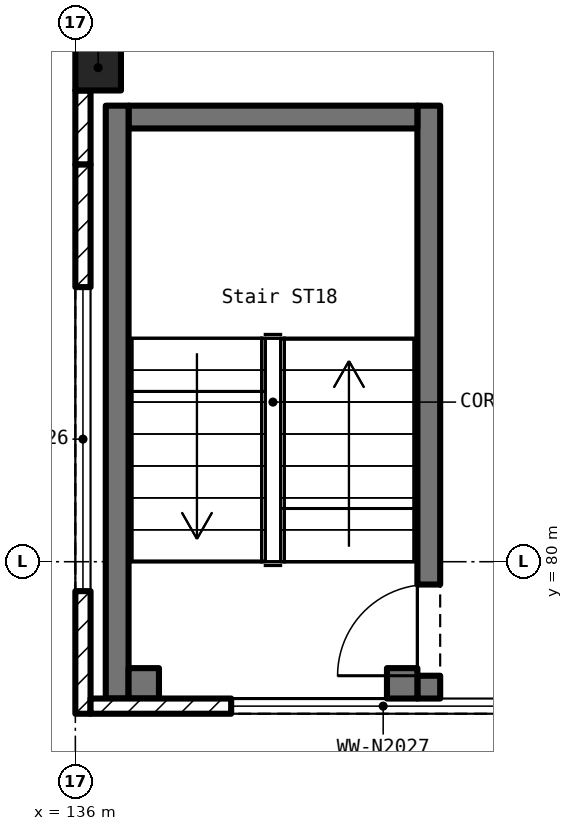
"""IFC4 building model, lengths in metres.
Left out: names, types, materials, properties, quantities, classifications, styles, units other than length and angle.
Written with IfcOpenShell. Run it as: python <this file> out.ifc"""

import sys

from ifc_helpers import new_model, si_unit, direction, frame, frame_2d, origin, origin_2d, place, context, subcontext, project, spatial, rectangle, extrude, element, fill, save


model = new_model("IFC4")
c1 = context("Model", 3, precision=1e-05, world=origin(), true_north=direction((0.0, 1.0)))
c2 = subcontext(c1, "Body", "Model", "MODEL_VIEW")
j1 = project(units=[si_unit("LENGTHUNIT", "METRE"), si_unit("PLANEANGLEUNIT", "RADIAN")], contexts=[c1])
p1 = place(None, origin())
s1 = spatial("IfcSite", under=j1, at=p1, CompositionType="ELEMENT")
p2 = place(p1, origin())
s2 = spatial("IfcBuilding", under=s1, at=p2, CompositionType="ELEMENT")
p3 = place(p2, frame((0.0, 0.0, 11.5)))
s3 = spatial("IfcBuildingStorey", under=s2, at=p3, CompositionType="ELEMENT", Elevation=11.5)
p4 = place(p3, frame((136.3, 86.5, 0.0), z_axis=(0.0, 0.0, 1.0), x_axis=(1.0, 0.0, 0.0)))
e1 = element("IfcColumn", 1, at=p4, inside=s3, PredefinedType="COLUMN", context=c2, shape_type="SweptSolid", body=[
    extrude(rectangle(XDim=0.6, YDim=0.6, at=origin_2d()), origin(), (0.0, 0.0, 1.0), 5.5),
])
p5 = place(p3, frame((136.1, 86.2, 0.0), z_axis=(0.0, 0.0, 1.0), x_axis=(0.0, -1.0, 0.0)))
e2 = element("IfcWall", 2, at=p5, inside=s3, PredefinedType="SOLIDWALL", context=c2, shape_type="SweptSolid", body=[
    extrude(rectangle(XDim=0.975, YDim=0.2, at=frame_2d((0.487, 0.0))), origin(), (0.0, 0.0, 1.0), 4.55),
])
p6 = place(p3, frame((136.1, 85.225, 0.0), z_axis=(0.0, 0.0, 1.0), x_axis=(0.0, -1.0, 0.0)))
e3 = element("IfcWall", 3, at=p6, inside=s3, PredefinedType="SOLIDWALL", context=c2, shape_type="SweptSolid", body=[
    extrude(rectangle(XDim=7.225, YDim=0.2, at=frame_2d((3.613, 0.0))), origin(), (0.0, 0.0, 1.0), 4.55),
])
p7 = place(p6, frame((1.612, 0.0, 1.0)))
e4 = element("IfcOpeningElement", 4, at=p7, cuts=e3, PredefinedType="OPENING", context=c2, shape_type="SweptSolid", body=[
    extrude(rectangle(XDim=4.0, YDim=1.8, at=frame_2d((2.0, 0.9))), frame((0.0, 0.112, 0.0), z_axis=(0.0, -1.0, 0.0), x_axis=(1.0, 0.0, 0.0)), (0.0, 0.0, 1.0), 0.224),
])
p8 = place(p3, frame((136.2, 78.1, 0.0), z_axis=(0.0, 0.0, 1.0), x_axis=(1.0, 0.0, 0.0)))
e5 = element("IfcWall", 5, at=p8, inside=s3, PredefinedType="SOLIDWALL", context=c2, shape_type="SweptSolid", body=[
    extrude(rectangle(XDim=7.7, YDim=0.2, at=frame_2d((3.85, 0.0))), origin(), (0.0, 0.0, 1.0), 4.55),
])
p9 = place(p8, frame((1.85, 0.0, 1.0)))
e6 = element("IfcOpeningElement", 6, at=p9, cuts=e5, PredefinedType="OPENING", context=c2, shape_type="SweptSolid", body=[
    extrude(rectangle(XDim=4.0, YDim=1.8, at=frame_2d((2.0, 0.9))), frame((0.0, 0.112, 0.0), z_axis=(0.0, -1.0, 0.0), x_axis=(1.0, 0.0, 0.0)), (0.0, 0.0, 1.0), 0.224),
])
p10 = place(p3, frame((140.65, 78.2, 0.0), z_axis=(0.0, 0.0, 1.0), x_axis=(0.0, 1.0, 0.0)))
e7 = element("IfcWall", 7, at=p10, inside=s3, PredefinedType="SOLIDWALL", context=c2, shape_type="SweptSolid", body=[
    extrude(rectangle(XDim=7.8, YDim=0.3, at=frame_2d((3.9, 0.0))), origin(), (0.0, 0.0, 1.0), 5.5),
])
p11 = place(p10, frame((0.3, 0.0, 0.0)))
e8 = element("IfcOpeningElement", 8, at=p11, cuts=e7, PredefinedType="OPENING", context=c2, shape_type="SweptSolid", body=[
    extrude(rectangle(XDim=1.2, YDim=2.1, at=frame_2d((0.6, 1.05))), frame((0.0, 0.162, 0.0), z_axis=(0.0, -1.0, 0.0), x_axis=(1.0, 0.0, 0.0)), (0.0, 0.0, 1.0), 0.324),
])
p12 = place(p3, frame((140.5, 85.85, 0.0), z_axis=(0.0, 0.0, 1.0), x_axis=(-1.0, 0.0, 0.0)))
e9 = element("IfcWall", 9, at=p12, inside=s3, PredefinedType="SOLIDWALL", context=c2, shape_type="SweptSolid", body=[
    extrude(rectangle(XDim=3.8, YDim=0.3, at=frame_2d((1.9, 0.0))), origin(), (0.0, 0.0, 1.0), 5.5),
])
p13 = place(p3, frame((136.55, 86.0, 0.0), z_axis=(0.0, 0.0, 1.0), x_axis=(0.0, -1.0, 0.0)))
e10 = element("IfcWall", 10, at=p13, inside=s3, PredefinedType="SOLIDWALL", context=c2, shape_type="SweptSolid", body=[
    extrude(rectangle(XDim=7.8, YDim=0.3, at=frame_2d((3.9, 0.0))), origin(), (0.0, 0.0, 1.0), 5.5),
])
p14 = place(p3, frame((136.7, 78.4, 0.0), z_axis=(0.0, 0.0, 1.0), x_axis=(1.0, 0.0, 0.0)))
e11 = element("IfcWall", 11, at=p14, inside=s3, PredefinedType="SOLIDWALL", context=c2, shape_type="SweptSolid", body=[
    extrude(rectangle(XDim=0.4, YDim=0.4, at=frame_2d((0.2, 0.0))), origin(), (0.0, 0.0, 1.0), 5.5),
])
p15 = place(p3, frame((140.1, 78.4, 0.0), z_axis=(0.0, 0.0, 1.0), x_axis=(1.0, 0.0, 0.0)))
e12 = element("IfcWall", 12, at=p15, inside=s3, PredefinedType="SOLIDWALL", context=c2, shape_type="SweptSolid", body=[
    extrude(rectangle(XDim=0.4, YDim=0.4, at=frame_2d((0.2, 0.0))), origin(), (0.0, 0.0, 1.0), 5.5),
])
p16 = place(p7, origin())
e13 = element("IfcWindow", 13, at=p16, inside=s3, PartitioningType="DOUBLE_PANEL_VERTICAL", PredefinedType="WINDOW", context=c2, shape_type="SweptSolid", body=[
    extrude(rectangle(XDim=4.0, YDim=1.8, at=frame_2d((2.0, 0.9))), frame((0.0, 0.03, 0.0), z_axis=(0.0, -1.0, 0.0), x_axis=(1.0, 0.0, 0.0)), (0.0, 0.0, 1.0), 0.06),
])
fill(e4, e13)
p17 = place(p9, origin())
e14 = element("IfcWindow", 14, at=p17, inside=s3, PartitioningType="DOUBLE_PANEL_VERTICAL", PredefinedType="WINDOW", context=c2, shape_type="SweptSolid", body=[
    extrude(rectangle(XDim=4.0, YDim=1.8, at=frame_2d((2.0, 0.9))), frame((0.0, 0.03, 0.0), z_axis=(0.0, -1.0, 0.0), x_axis=(1.0, 0.0, 0.0)), (0.0, 0.0, 1.0), 0.06),
])
fill(e6, e14)
p18 = place(p11, origin())
e15 = element("IfcDoor", 15, at=p18, inside=s3, OperationType="SINGLE_SWING_LEFT", PredefinedType="DOOR", context=c2, shape_type="SweptSolid", body=[
    extrude(rectangle(XDim=1.2, YDim=2.1, at=frame_2d((0.6, 1.05))), frame((0.0, 0.025, 0.0), z_axis=(0.0, -1.0, 0.0), x_axis=(1.0, 0.0, 0.0)), (0.0, 0.0, 1.0), 0.05),
])
fill(e8, e15)
save(model, sys.argv[1])
